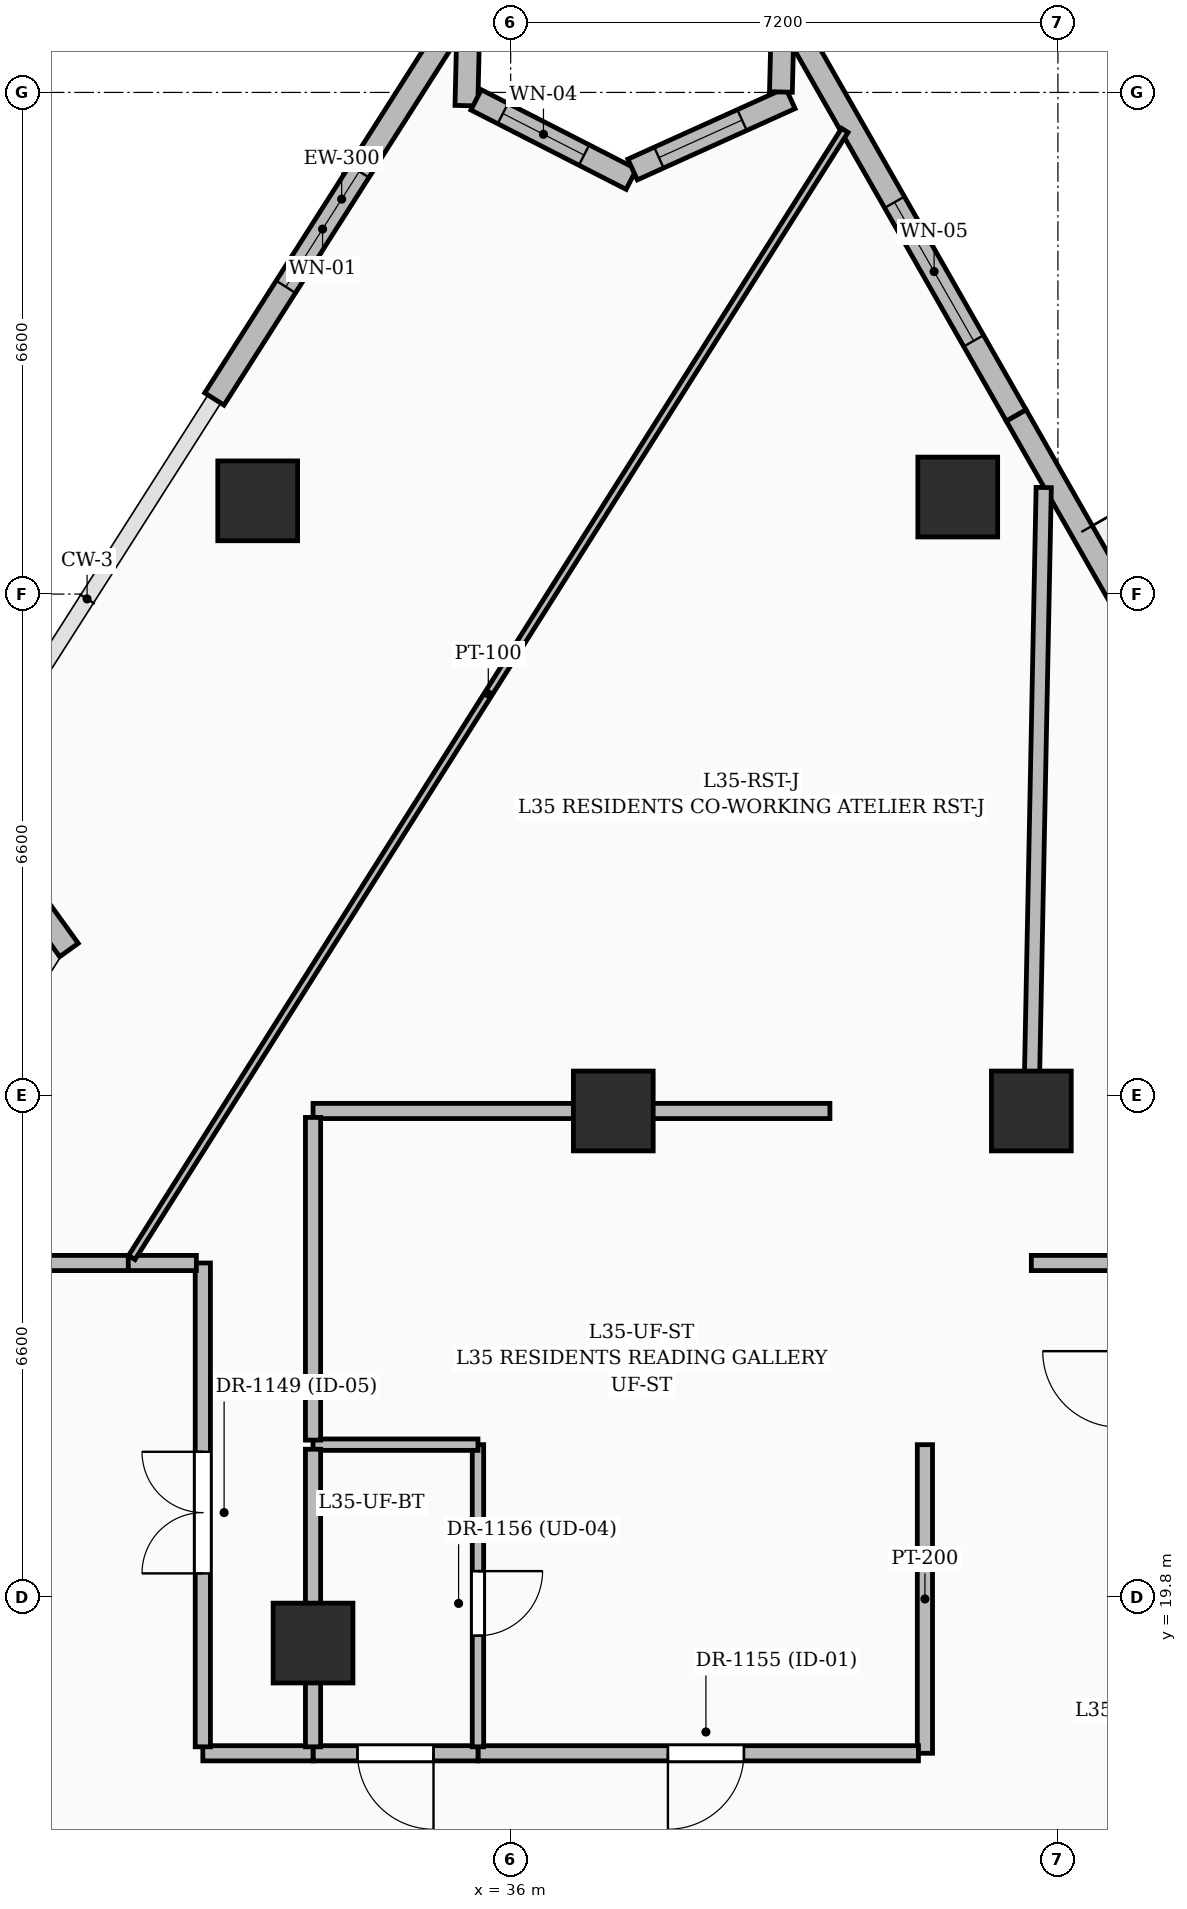
"""IFC4 building model, lengths in metres.
Left out: names, types, materials, properties, quantities, classifications, styles, units other than length and angle.
Written with IfcOpenShell. Run it as: python <this file> out.ifc"""

import sys

from ifc_helpers import new_model, si_unit, direction, frame, frame_2d, origin, origin_2d, place, context, subcontext, project, spatial, rectangle, extrude, element, fill, save


model = new_model("IFC4")
c1 = context("Model", 3, precision=1e-05, world=origin(), true_north=direction((0.0, 1.0)))
c2 = subcontext(c1, "Body", "Model", "MODEL_VIEW")
j1 = project(units=[si_unit("LENGTHUNIT", "METRE"), si_unit("PLANEANGLEUNIT", "RADIAN")], contexts=[c1])
p1 = place(None, origin())
s1 = spatial("IfcSite", under=j1, at=p1, CompositionType="ELEMENT")
p2 = place(p1, origin())
s2 = spatial("IfcBuilding", under=s1, at=p2, CompositionType="ELEMENT")
p3 = place(p2, frame((0.0, 0.0, 139.2)))
s3 = spatial("IfcBuildingStorey", under=s2, at=p3, CompositionType="ELEMENT", Elevation=139.2)
for number, where, z_axis, x_axis in (
    (1, (42.85, 26.2, 0.0), (0.0, 0.0, 1.0), (1.0, 0.0, 0.0)),
    (2, (37.35, 26.2, 0.0), (0.0, 0.0, 1.0), (1.0, 0.0, 0.0)),
    (3, (33.4, 19.2, 0.0), (0.0, 0.0, 1.0), (1.0, 0.0, 0.0)),
    (4, (41.882, 34.277, 0.0), (0.0, 0.0, 1.0), (1.0, 0.0, 0.0)),
    (5, (32.672, 34.227, 0.0), (0.0, 0.0, 1.0), (1.0, 0.0, 0.0)),
):
    element("IfcColumn", number, at=place(p3, frame(where, z_axis=z_axis, x_axis=x_axis)), inside=s3, PredefinedType="COLUMN", context=c2, shape_type="SweptSolid", body=[
        extrude(rectangle(XDim=1.05, YDim=1.05, at=origin_2d()), origin(), (0.0, 0.0, 1.0), 3.6),
    ])
p4 = place(p3, frame((30.189, 28.317, 0.0), z_axis=(0.0, 0.0, 1.0), x_axis=(-0.585229316709, 0.810867835633, 0.0)))
e6 = element("IfcWall", 6, at=p4, inside=s3, PredefinedType="SOLIDWALL", context=c2, shape_type="SweptSolid", body=[
    extrude(rectangle(XDim=2.594, YDim=0.3, at=frame_2d((1.297, 0.0))), origin(), (0.0, 0.0, 1.0), 2.575),
])
p5 = place(p3, frame((32.102, 35.566, 0.0), z_axis=(0.0, 0.0, 1.0), x_axis=(0.537093362062, 0.84352280374, 0.0)))
e7 = element("IfcWall", 7, at=p5, inside=s3, PredefinedType="SOLIDWALL", context=c2, shape_type="SweptSolid", body=[
    extrude(rectangle(XDim=6.235, YDim=0.3, at=frame_2d((3.118, 0.0))), origin(), (0.0, 0.0, 1.0), 3.35),
])
p6 = place(p5, frame((1.75, 0.0, 0.6)))
e8 = element("IfcOpeningElement", 8, at=p6, cuts=e7, PredefinedType="OPENING", context=c2, shape_type="SweptSolid", body=[
    extrude(rectangle(XDim=1.8, YDim=2.1, at=frame_2d((0.9, 1.05))), frame((0.0, 0.16, 0.0), z_axis=(0.0, -1.0, 0.0), x_axis=(1.0, 0.0, 0.0)), (0.0, 0.0, 1.0), 0.32),
])
p7 = place(p3, frame((35.44, 40.381, 0.0), z_axis=(0.0, 0.0, 1.0), x_axis=(-0.023766291255, -0.999717541809, 0.0)))
e9 = element("IfcWall", 9, at=p7, inside=s3, PredefinedType="SOLIDWALL", context=c2, shape_type="SweptSolid", body=[
    extrude(rectangle(XDim=0.955, YDim=0.3, at=frame_2d((0.478, 0.0))), origin(), (0.0, 0.0, 1.0), 3.35),
])
p8 = place(p3, frame((35.546, 39.502, 0.0), z_axis=(0.0, 0.0, 1.0), x_axis=(0.890388661124, -0.455201089786, 0.0)))
e10 = element("IfcWall", 10, at=p8, inside=s3, PredefinedType="SOLIDWALL", context=c2, shape_type="SweptSolid", body=[
    extrude(rectangle(XDim=2.293, YDim=0.3, at=frame_2d((1.147, 0.0))), origin(), (0.0, 0.0, 1.0), 3.35),
])
p9 = place(p8, frame((0.395, 0.0, 0.8)))
e11 = element("IfcOpeningElement", 11, at=p9, cuts=e10, PredefinedType="OPENING", context=c2, shape_type="SweptSolid", body=[
    extrude(rectangle(XDim=1.2, YDim=1.8, at=frame_2d((0.6, 0.9))), frame((0.0, 0.16, 0.0), z_axis=(0.0, -1.0, 0.0), x_axis=(1.0, 0.0, 0.0)), (0.0, 0.0, 1.0), 0.32),
])
p10 = place(p3, frame((37.604, 38.586, 0.0), z_axis=(0.0, 0.0, 1.0), x_axis=(0.911256421967, 0.411839451029, 0.0)))
e12 = element("IfcWall", 12, at=p10, inside=s3, PredefinedType="SOLIDWALL", context=c2, shape_type="SweptSolid", body=[
    extrude(rectangle(XDim=2.278, YDim=0.3, at=frame_2d((1.139, 0.0))), origin(), (0.0, 0.0, 1.0), 3.35),
])
p11 = place(p10, frame((0.38, 0.0, 0.8)))
e13 = element("IfcOpeningElement", 13, at=p11, cuts=e12, PredefinedType="OPENING", context=c2, shape_type="SweptSolid", body=[
    extrude(rectangle(XDim=1.2, YDim=1.8, at=frame_2d((0.6, 0.9))), frame((0.0, 0.16, 0.0), z_axis=(0.0, -1.0, 0.0), x_axis=(1.0, 0.0, 0.0)), (0.0, 0.0, 1.0), 0.32),
])
p12 = place(p3, frame((39.555, 39.606, 0.0), z_axis=(0.0, 0.0, 1.0), x_axis=(0.024600187161, 0.999697369603, 0.0)))
e14 = element("IfcWall", 14, at=p12, inside=s3, PredefinedType="SOLIDWALL", context=c2, shape_type="SweptSolid", body=[
    extrude(rectangle(XDim=1.26, YDim=0.3, at=frame_2d((0.63, 0.0))), origin(), (0.0, 0.0, 1.0), 3.35),
])
p13 = place(p3, frame((39.801, 40.344, 0.0), z_axis=(0.0, 0.0, 1.0), x_axis=(0.495718237465, -0.868483407467, 0.0)))
e15 = element("IfcWall", 15, at=p13, inside=s3, PredefinedType="SOLIDWALL", context=c2, shape_type="SweptSolid", body=[
    extrude(rectangle(XDim=5.75, YDim=0.3, at=frame_2d((2.875, 0.0))), origin(), (0.0, 0.0, 1.0), 3.35),
])
p14 = place(p13, frame((2.52, 0.0, 0.55)))
e16 = element("IfcOpeningElement", 16, at=p14, cuts=e15, PredefinedType="OPENING", context=c2, shape_type="SweptSolid", body=[
    extrude(rectangle(XDim=2.1, YDim=2.4, at=frame_2d((1.05, 1.2))), frame((0.0, 0.16, 0.0), z_axis=(0.0, -1.0, 0.0), x_axis=(1.0, 0.0, 0.0)), (0.0, 0.0, 1.0), 0.32),
])
p15 = place(p3, frame((42.652, 35.35, 0.0), z_axis=(0.0, 0.0, 1.0), x_axis=(0.495702771017, -0.868492235317, 0.0)))
e17 = element("IfcWall", 17, at=p15, inside=s3, PredefinedType="SOLIDWALL", context=c2, shape_type="SweptSolid", body=[
    extrude(rectangle(XDim=6.33, YDim=0.3, at=frame_2d((3.165, 0.0))), origin(), (0.0, 0.0, 1.0), 3.35),
])
p16 = place(p15, frame((3.888, 0.0, 0.0)))
e18 = element("IfcOpeningElement", 18, at=p16, cuts=e17, PredefinedType="OPENING", context=c2, shape_type="SweptSolid", body=[
    extrude(rectangle(XDim=1.0, YDim=2.2, at=frame_2d((0.5, 1.1))), frame((0.0, 0.16, 0.0), z_axis=(0.0, -1.0, 0.0), x_axis=(1.0, 0.0, 0.0)), (0.0, 0.0, 1.0), 0.32),
])
p17 = place(p3, frame((41.45, 21.81, 0.0), z_axis=(0.0, 0.0, 1.0), x_axis=(0.0, -1.0, 0.0)))
e19 = element("IfcWall", 19, at=p17, inside=s3, PredefinedType="PARTITIONING", context=c2, shape_type="SweptSolid", body=[
    extrude(rectangle(XDim=4.06, YDim=0.2, at=frame_2d((2.03, 0.0))), origin(), (0.0, 0.0, 1.0), 3.35),
])
p18 = place(p3, frame((41.365, 17.75, 0.0), z_axis=(0.0, 0.0, 1.0), x_axis=(-1.0, 0.0, 0.0)))
e20 = element("IfcWall", 20, at=p18, inside=s3, PredefinedType="PARTITIONING", context=c2, shape_type="SweptSolid", body=[
    extrude(rectangle(XDim=5.795, YDim=0.2, at=frame_2d((2.897, 0.0))), origin(), (0.0, 0.0, 1.0), 3.35),
])
p19 = place(p18, frame((2.296, 0.0, 0.0)))
e21 = element("IfcOpeningElement", 21, at=p19, cuts=e20, PredefinedType="OPENING", context=c2, shape_type="SweptSolid", body=[
    extrude(rectangle(XDim=1.0, YDim=2.2, at=frame_2d((0.5, 1.1))), frame((0.0, 0.11, 0.0), z_axis=(0.0, -1.0, 0.0), x_axis=(1.0, 0.0, 0.0)), (0.0, 0.0, 1.0), 0.22),
])
p20 = place(p3, frame((35.57, 17.75, 0.0), z_axis=(0.0, 0.0, 1.0), x_axis=(-1.0, 0.0, 0.0)))
e22 = element("IfcWall", 22, at=p20, inside=s3, PredefinedType="PARTITIONING", context=c2, shape_type="SweptSolid", body=[
    extrude(rectangle(XDim=2.17, YDim=0.2, at=frame_2d((1.085, 0.0))), origin(), (0.0, 0.0, 1.0), 2.436),
])
p21 = place(p20, frame((0.585, 0.0, 0.0)))
e23 = element("IfcOpeningElement", 23, at=p21, cuts=e22, PredefinedType="OPENING", context=c2, shape_type="SweptSolid", body=[
    extrude(rectangle(XDim=1.0, YDim=2.2, at=frame_2d((0.5, 1.1))), frame((0.0, 0.11, 0.0), z_axis=(0.0, -1.0, 0.0), x_axis=(1.0, 0.0, 0.0)), (0.0, 0.0, 1.0), 0.22),
])
p22 = place(p3, frame((43.915, 24.2, 0.0), z_axis=(0.0, 0.0, 1.0), x_axis=(-1.0, 0.0, 0.0)))
e24 = element("IfcWall", 24, at=p22, inside=s3, PredefinedType="PARTITIONING", context=c2, shape_type="SweptSolid", body=[
    extrude(rectangle(XDim=1.065, YDim=0.2, at=frame_2d((0.532, 0.0))), origin(), (0.0, 0.0, 1.0), 2.436),
])
p23 = place(p3, frame((30.97, 24.2, 0.0), z_axis=(0.0, 0.0, 1.0), x_axis=(-1.0, 0.0, 0.0)))
e25 = element("IfcWall", 25, at=p23, inside=s3, PredefinedType="PARTITIONING", context=c2, shape_type="SweptSolid", body=[
    extrude(rectangle(XDim=1.57, YDim=0.2, at=frame_2d((0.785, 0.0))), origin(), (0.0, 0.0, 1.0), 2.712),
])
p24 = place(p3, frame((33.4, 17.75, 0.0), z_axis=(0.0, 0.0, 1.0), x_axis=(-1.0, 0.0, 0.0)))
e26 = element("IfcWall", 26, at=p24, inside=s3, PredefinedType="PARTITIONING", context=c2, shape_type="SweptSolid", body=[
    extrude(rectangle(XDim=1.45, YDim=0.2, at=frame_2d((0.725, 0.0))), origin(), (0.0, 0.0, 1.0), 3.35),
])
p25 = place(p3, frame((31.95, 17.835, 0.0), z_axis=(0.0, 0.0, 1.0), x_axis=(0.0, 1.0, 0.0)))
e27 = element("IfcWall", 27, at=p25, inside=s3, PredefinedType="PARTITIONING", context=c2, shape_type="SweptSolid", body=[
    extrude(rectangle(XDim=6.365, YDim=0.2, at=frame_2d((3.183, 0.0))), origin(), (0.0, 0.0, 1.0), 2.393),
])
p26 = place(p25, frame((2.281, 0.0, 0.0)))
e28 = element("IfcOpeningElement", 28, at=p26, cuts=e27, PredefinedType="OPENING", context=c2, shape_type="SweptSolid", body=[
    extrude(rectangle(XDim=1.6, YDim=2.3, at=frame_2d((0.8, 1.15))), frame((0.0, 0.11, 0.0), z_axis=(0.0, -1.0, 0.0), x_axis=(1.0, 0.0, 0.0)), (0.0, 0.0, 1.0), 0.22),
])
p27 = place(p3, frame((31.865, 24.2, 0.0), z_axis=(0.0, 0.0, 1.0), x_axis=(-1.0, 0.0, 0.0)))
e29 = element("IfcWall", 29, at=p27, inside=s3, PredefinedType="PARTITIONING", context=c2, shape_type="SweptSolid", body=[
    extrude(rectangle(XDim=0.895, YDim=0.2, at=frame_2d((0.448, 0.0))), origin(), (0.0, 0.0, 1.0), 2.712),
])
p28 = place(p3, frame((35.57, 21.81, 0.0), z_axis=(0.0, 0.0, 1.0), x_axis=(0.0, -1.0, 0.0)))
e30 = element("IfcWall", 30, at=p28, inside=s3, PredefinedType="PARTITIONING", context=c2, shape_type="SweptSolid", body=[
    extrude(rectangle(XDim=3.975, YDim=0.15, at=frame_2d((1.988, 0.0))), origin(), (0.0, 0.0, 1.0), 3.35),
])
p29 = place(p28, frame((1.664, 0.0, 0.0)))
e31 = element("IfcOpeningElement", 31, at=p29, cuts=e30, PredefinedType="OPENING", context=c2, shape_type="SweptSolid", body=[
    extrude(rectangle(XDim=0.85, YDim=2.1, at=frame_2d((0.425, 1.05))), frame((0.0, 0.085, 0.0), z_axis=(0.0, -1.0, 0.0), x_axis=(1.0, 0.0, 0.0)), (0.0, 0.0, 1.0), 0.17),
])
p30 = place(p3, frame((33.4, 21.81, 0.0), z_axis=(0.0, 0.0, 1.0), x_axis=(1.0, 0.0, 0.0)))
e32 = element("IfcWall", 32, at=p30, inside=s3, PredefinedType="PARTITIONING", context=c2, shape_type="SweptSolid", body=[
    extrude(rectangle(XDim=2.17, YDim=0.15, at=frame_2d((1.085, 0.0))), origin(), (0.0, 0.0, 1.0), 2.436),
])
p31 = place(p3, frame((40.2, 26.2, 0.0), z_axis=(0.0, 0.0, 1.0), x_axis=(-1.0, 0.0, 0.0)))
e33 = element("IfcWall", 33, at=p31, inside=s3, PredefinedType="PARTITIONING", context=c2, shape_type="SweptSolid", body=[
    extrude(rectangle(XDim=6.8, YDim=0.2, at=frame_2d((3.4, 0.0))), origin(), (0.0, 0.0, 1.0), 2.436),
])
p32 = place(p3, frame((33.4, 26.115, 0.0), z_axis=(0.0, 0.0, 1.0), x_axis=(0.0, -1.0, 0.0)))
e34 = element("IfcWall", 34, at=p32, inside=s3, PredefinedType="PARTITIONING", context=c2, shape_type="SweptSolid", body=[
    extrude(rectangle(XDim=4.245, YDim=0.2, at=frame_2d((2.123, 0.0))), origin(), (0.0, 0.0, 1.0), 2.712),
])
p33 = place(p3, frame((33.4, 21.75, 0.0), z_axis=(0.0, 0.0, 1.0), x_axis=(0.0, -1.0, 0.0)))
e35 = element("IfcWall", 35, at=p33, inside=s3, PredefinedType="PARTITIONING", context=c2, shape_type="SweptSolid", body=[
    extrude(rectangle(XDim=3.915, YDim=0.2, at=frame_2d((1.958, 0.0))), origin(), (0.0, 0.0, 1.0), 2.436),
])
p34 = place(p3, frame((43.013, 34.402, 0.0), z_axis=(0.0, 0.0, 1.0), x_axis=(-0.019849642377, -0.99980297644, 0.0)))
e36 = element("IfcWall", 36, at=p34, inside=s3, PredefinedType="PARTITIONING", context=c2, shape_type="SweptSolid", body=[
    extrude(rectangle(XDim=8.204, YDim=0.2, at=frame_2d((4.102, 0.0))), origin(), (0.0, 0.0, 1.0), 2.393),
])
p35 = place(p3, frame((31.015, 24.272, 0.0), z_axis=(0.0, 0.0, 1.0), x_axis=(0.534598518798, 0.8451061612, 0.0)))
e37 = element("IfcWall", 37, at=p35, inside=s3, PredefinedType="PARTITIONING", context=c2, shape_type="SweptSolid", body=[
    extrude(rectangle(XDim=17.547, YDim=0.1, at=frame_2d((8.773, 0.0))), origin(), (0.0, 0.0, 1.0), 2.393),
])
p36 = place(p6, origin())
e38 = element("IfcWindow", 38, at=p36, inside=s3, PartitioningType="SINGLE_PANEL", PredefinedType="WINDOW", context=c2, shape_type="SweptSolid", body=[
    extrude(rectangle(XDim=1.8, YDim=2.1, at=frame_2d((0.9, 1.05))), frame((0.0, 0.03, 0.0), z_axis=(0.0, -1.0, 0.0), x_axis=(1.0, 0.0, 0.0)), (0.0, 0.0, 1.0), 0.06),
])
fill(e8, e38)
p37 = place(p9, origin())
e39 = element("IfcWindow", 39, at=p37, inside=s3, PartitioningType="SINGLE_PANEL", PredefinedType="WINDOW", context=c2, shape_type="SweptSolid", body=[
    extrude(rectangle(XDim=1.2, YDim=1.8, at=frame_2d((0.6, 0.9))), frame((0.0, 0.03, 0.0), z_axis=(0.0, -1.0, 0.0), x_axis=(1.0, 0.0, 0.0)), (0.0, 0.0, 1.0), 0.06),
])
fill(e11, e39)
p38 = place(p11, origin())
e40 = element("IfcWindow", 40, at=p38, inside=s3, PartitioningType="SINGLE_PANEL", PredefinedType="WINDOW", context=c2, shape_type="SweptSolid", body=[
    extrude(rectangle(XDim=1.2, YDim=1.8, at=frame_2d((0.6, 0.9))), frame((0.0, 0.03, 0.0), z_axis=(0.0, -1.0, 0.0), x_axis=(1.0, 0.0, 0.0)), (0.0, 0.0, 1.0), 0.06),
])
fill(e13, e40)
p39 = place(p14, origin())
e41 = element("IfcWindow", 41, at=p39, inside=s3, PartitioningType="SINGLE_PANEL", PredefinedType="WINDOW", context=c2, shape_type="SweptSolid", body=[
    extrude(rectangle(XDim=2.1, YDim=2.4, at=frame_2d((1.05, 1.2))), frame((0.0, 0.03, 0.0), z_axis=(0.0, -1.0, 0.0), x_axis=(1.0, 0.0, 0.0)), (0.0, 0.0, 1.0), 0.06),
])
fill(e16, e41)
p40 = place(p26, origin())
e42 = element("IfcDoor", 42, at=p40, inside=s3, OperationType="DOUBLE_DOOR_SINGLE_SWING", PredefinedType="DOOR", context=c2, shape_type="SweptSolid", body=[
    extrude(rectangle(XDim=1.6, YDim=2.3, at=frame_2d((0.8, 1.15))), frame((0.0, 0.025, 0.0), z_axis=(0.0, -1.0, 0.0), x_axis=(1.0, 0.0, 0.0)), (0.0, 0.0, 1.0), 0.05),
])
fill(e28, e42)
p41 = place(p19, origin())
e43 = element("IfcDoor", 43, at=p41, inside=s3, OperationType="SINGLE_SWING_RIGHT", PredefinedType="DOOR", context=c2, shape_type="SweptSolid", body=[
    extrude(rectangle(XDim=1.0, YDim=2.2, at=frame_2d((0.5, 1.1))), frame((0.0, 0.025, 0.0), z_axis=(0.0, -1.0, 0.0), x_axis=(1.0, 0.0, 0.0)), (0.0, 0.0, 1.0), 0.05),
])
fill(e21, e43)
p42 = place(p29, origin())
e44 = element("IfcDoor", 44, at=p42, inside=s3, OperationType="SINGLE_SWING_LEFT", PredefinedType="DOOR", context=c2, shape_type="SweptSolid", body=[
    extrude(rectangle(XDim=0.85, YDim=2.1, at=frame_2d((0.425, 1.05))), frame((0.0, 0.025, 0.0), z_axis=(0.0, -1.0, 0.0), x_axis=(1.0, 0.0, 0.0)), (0.0, 0.0, 1.0), 0.05),
])
fill(e31, e44)
p43 = place(p21, origin())
e45 = element("IfcDoor", 45, at=p43, inside=s3, OperationType="SINGLE_SWING_LEFT", PredefinedType="DOOR", context=c2, shape_type="SweptSolid", body=[
    extrude(rectangle(XDim=1.0, YDim=2.2, at=frame_2d((0.5, 1.1))), frame((0.0, 0.025, 0.0), z_axis=(0.0, -1.0, 0.0), x_axis=(1.0, 0.0, 0.0)), (0.0, 0.0, 1.0), 0.05),
])
fill(e23, e45)
save(model, sys.argv[1])
